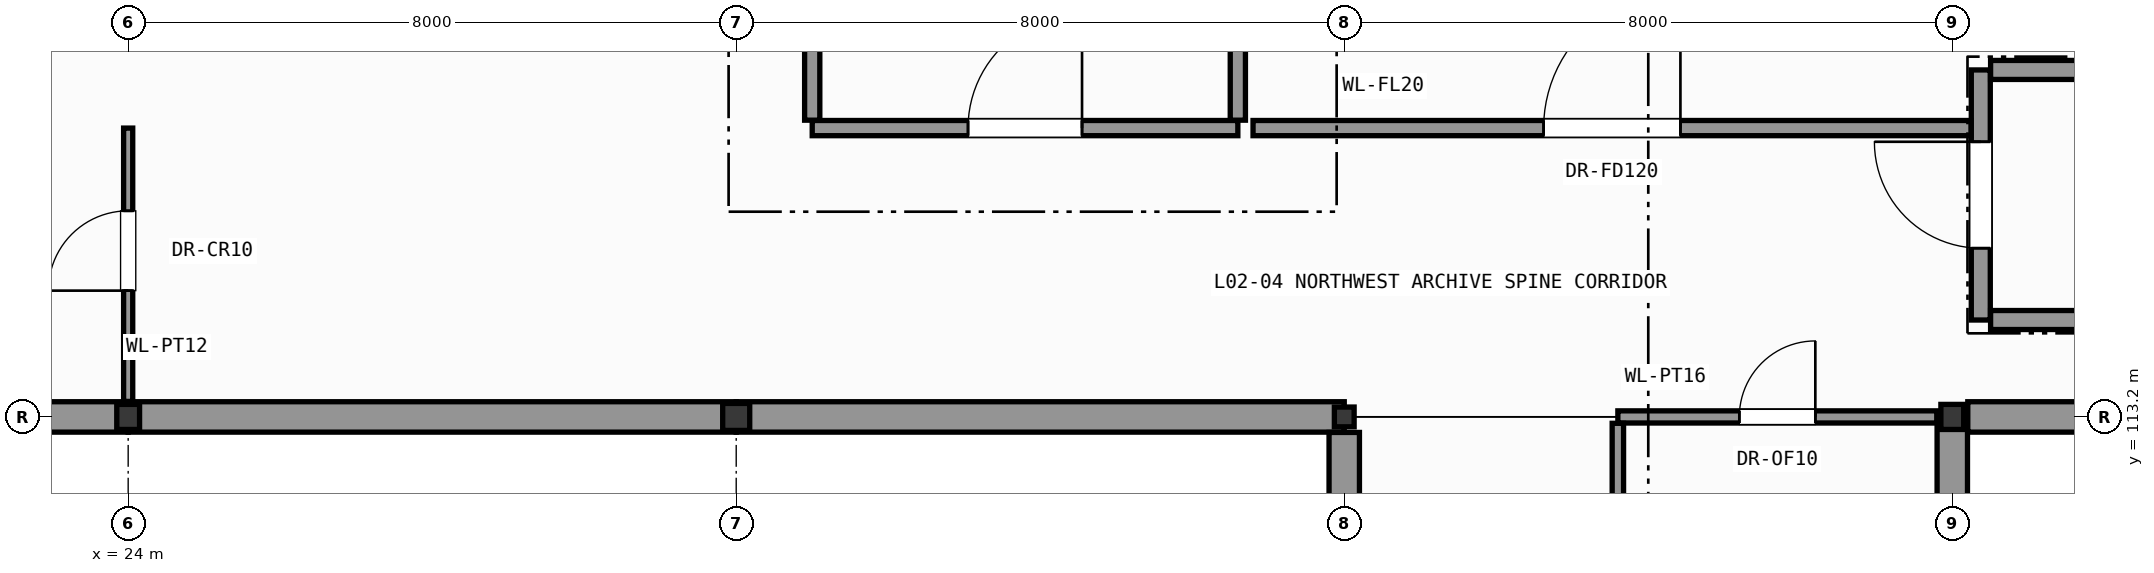
"""IFC4 building model, lengths in metres.
Left out: names, types, materials, properties, quantities, classifications, styles, units other than length and angle.
Written with IfcOpenShell. Run it as: python <this file> out.ifc"""

import sys

from ifc_helpers import new_model, si_unit, direction, frame, frame_2d, origin, origin_2d, place, context, subcontext, project, spatial, rectangle, hollow_rectangle, hollow_circle, i_section, extrude, element, fill, save


model = new_model("IFC4")
c1 = context("Model", 3, precision=1e-05, world=origin(), true_north=direction((0.0, 1.0)))
c2 = subcontext(c1, "Body", "Model", "MODEL_VIEW")
j1 = project(units=[si_unit("LENGTHUNIT", "METRE"), si_unit("PLANEANGLEUNIT", "RADIAN")], contexts=[c1])
p1 = place(None, origin())
s1 = spatial("IfcSite", under=j1, at=p1, CompositionType="ELEMENT")
p2 = place(p1, origin())
s2 = spatial("IfcBuilding", under=s1, at=p2, CompositionType="ELEMENT")
p3 = place(p2, frame((0.0, 0.0, 7.8)))
s3 = spatial("IfcBuildingStorey", under=s2, at=p3, CompositionType="ELEMENT", Elevation=7.8)
p4 = place(p3, frame((24.0, 113.2, 0.0), z_axis=(0.0, 0.0, 1.0), x_axis=(1.0, 0.0, 0.0)))
e1 = element("IfcColumn", 1, at=p4, inside=s3, PredefinedType="COLUMN", context=c2, shape_type="SweptSolid", body=[
    extrude(i_section(OverallWidth=0.3, OverallDepth=0.33, WebThickness=0.01, FlangeThickness=0.017, FilletRadius=0.027, at=origin_2d()), origin(), (0.0, 0.0, 1.0), 5.4),
])
p5 = place(p3, frame((32.0, 113.2, 0.0), z_axis=(0.0, 0.0, 1.0), x_axis=(1.0, 0.0, 0.0)))
e2 = element("IfcColumn", 2, at=p5, inside=s3, PredefinedType="COLUMN", context=c2, shape_type="SweptSolid", body=[
    extrude(hollow_circle(Radius=0.178, WallThickness=0.016, at=origin_2d()), origin(), (0.0, 0.0, 1.0), 5.4),
])
p6 = place(p3, frame((40.0, 113.2, 0.0), z_axis=(0.0, 0.0, 1.0), x_axis=(1.0, 0.0, 0.0)))
e3 = element("IfcColumn", 3, at=p6, inside=s3, PredefinedType="COLUMN", context=c2, shape_type="SweptSolid", body=[
    extrude(hollow_rectangle(XDim=0.26, YDim=0.26, WallThickness=0.012, InnerFilletRadius=0.012, OuterFilletRadius=0.025, at=origin_2d()), origin(), (0.0, 0.0, 1.0), 5.4),
])
p7 = place(p3, frame((48.0, 113.2, 0.0), z_axis=(0.0, 0.0, 1.0), x_axis=(1.0, 0.0, 0.0)))
e4 = element("IfcColumn", 4, at=p7, inside=s3, PredefinedType="COLUMN", context=c2, shape_type="SweptSolid", body=[
    extrude(i_section(OverallWidth=0.3, OverallDepth=0.33, WebThickness=0.01, FlangeThickness=0.017, FilletRadius=0.027, at=origin_2d()), origin(), (0.0, 0.0, 1.0), 5.4),
])
p8 = place(p3, frame((48.0, 113.2, 0.0), z_axis=(0.0, 0.0, 1.0), x_axis=(0.0, -1.0, 0.0)))
e5 = element("IfcWall", 5, at=p8, inside=s3, PredefinedType="SOLIDWALL", context=c2, shape_type="SweptSolid", body=[
    extrude(rectangle(XDim=7.6, YDim=0.4, at=frame_2d((3.8, 0.0))), origin(), (0.0, 0.0, 1.0), 5.15),
])
p9 = place(p3, frame((56.0, 113.2, 0.0), z_axis=(0.0, 0.0, 1.0), x_axis=(-1.0, 0.0, 0.0)))
e6 = element("IfcWall", 6, at=p9, inside=s3, PredefinedType="SOLIDWALL", context=c2, shape_type="SweptSolid", body=[
    extrude(rectangle(XDim=7.796, YDim=0.4, at=frame_2d((3.898, 0.0))), origin(), (0.0, 0.0, 1.0), 5.15),
])
p10 = place(p3, frame((24.0, 113.2, 0.0), z_axis=(0.0, 0.0, 1.0), x_axis=(-1.0, 0.0, 0.0)))
e7 = element("IfcWall", 7, at=p10, inside=s3, PredefinedType="SOLIDWALL", context=c2, shape_type="SweptSolid", body=[
    extrude(rectangle(XDim=4.8, YDim=0.4, at=frame_2d((2.4, 0.0))), origin(), (0.0, 0.0, 1.0), 5.15),
])
for number, where, z_axis, x_axis in (
    (8, (32.0, 113.2, 0.0), (0.0, 0.0, 1.0), (-1.0, 0.0, 0.0)),
    (9, (40.0, 113.2, 0.0), (0.0, 0.0, 1.0), (-1.0, 0.0, 0.0)),
):
    element("IfcWall", number, at=place(p3, frame(where, z_axis=z_axis, x_axis=x_axis)), inside=s3, PredefinedType="SOLIDWALL", context=c2, shape_type="SweptSolid", body=[
        extrude(rectangle(XDim=8.0, YDim=0.4, at=frame_2d((4.0, 0.0))), origin(), (0.0, 0.0, 1.0), 5.15),
    ])
p11 = place(p3, frame((40.0, 105.6, 0.0), z_axis=(0.0, 0.0, 1.0), x_axis=(0.0, 1.0, 0.0)))
e10 = element("IfcWall", 10, at=p11, inside=s3, PredefinedType="SOLIDWALL", context=c2, shape_type="SweptSolid", body=[
    extrude(rectangle(XDim=7.396, YDim=0.4, at=frame_2d((3.698, 0.0))), origin(), (0.0, 0.0, 1.0), 5.15),
])
p12 = place(p3, frame((48.375, 114.475, 0.0), z_axis=(0.0, 0.0, 1.0), x_axis=(0.0, 1.0, 0.0)))
e11 = element("IfcWall", 11, at=p12, inside=s3, PredefinedType="SHEAR", context=c2, shape_type="SweptSolid", body=[
    extrude(rectangle(XDim=3.29, YDim=0.25, at=frame_2d((1.645, 0.0))), origin(), (0.0, 0.0, 1.0), 5.15),
])
p13 = place(p12, frame((0.945, 0.0, 0.0)))
e12 = element("IfcOpeningElement", 12, at=p13, cuts=e11, PredefinedType="OPENING", context=c2, shape_type="SweptSolid", body=[
    extrude(rectangle(XDim=1.4, YDim=2.2, at=frame_2d((0.7, 1.1))), frame((0.0, 0.135, 0.0), z_axis=(0.0, -1.0, 0.0), x_axis=(1.0, 0.0, 0.0)), (0.0, 0.0, 1.0), 0.27),
])
for number, where, z_axis, x_axis in (
    (13, (48.504, 114.475, 0.0), (0.0, 0.0, 1.0), (1.0, 0.0, 0.0)),
    (14, (48.504, 117.765, 0.0), (0.0, 0.0, 1.0), (1.0, 0.0, 0.0)),
):
    element("IfcWall", number, at=place(p3, frame(where, z_axis=z_axis, x_axis=x_axis)), inside=s3, PredefinedType="SHEAR", context=c2, shape_type="SweptSolid", body=[
        extrude(rectangle(XDim=6.892, YDim=0.25, at=frame_2d((3.446, 0.0))), origin(), (0.0, 0.0, 1.0), 5.15),
    ])
p14 = place(p3, frame((33.0, 117.0, 0.0), z_axis=(0.0, 0.0, 1.0), x_axis=(1.0, 0.0, 0.0)))
e15 = element("IfcWall", 15, at=p14, inside=s3, PredefinedType="PARTITIONING", context=c2, shape_type="SweptSolid", body=[
    extrude(rectangle(XDim=5.6, YDim=0.2, at=frame_2d((2.8, 0.0))), origin(), (0.0, 0.0, 1.0), 5.15),
])
p15 = place(p14, frame((2.05, 0.0, 0.0)))
e16 = element("IfcOpeningElement", 16, at=p15, cuts=e15, PredefinedType="OPENING", context=c2, shape_type="SweptSolid", body=[
    extrude(rectangle(XDim=1.5, YDim=2.2, at=frame_2d((0.75, 1.1))), frame((0.0, 0.11, 0.0), z_axis=(0.0, -1.0, 0.0), x_axis=(1.0, 0.0, 0.0)), (0.0, 0.0, 1.0), 0.22),
])
for number, where, z_axis, x_axis in (
    (17, (33.0, 117.104, 0.0), (0.0, 0.0, 1.0), (0.0, 1.0, 0.0)),
    (18, (38.6, 117.104, 0.0), (0.0, 0.0, 1.0), (0.0, 1.0, 0.0)),
):
    element("IfcWall", number, at=place(p3, frame(where, z_axis=z_axis, x_axis=x_axis)), inside=s3, PredefinedType="PARTITIONING", context=c2, shape_type="SweptSolid", body=[
        extrude(rectangle(XDim=5.096, YDim=0.2, at=frame_2d((2.548, 0.0))), origin(), (0.0, 0.0, 1.0), 5.15),
    ])
p16 = place(p3, frame((38.8, 117.0, 0.0), z_axis=(0.0, 0.0, 1.0), x_axis=(1.0, 0.0, 0.0)))
e19 = element("IfcWall", 19, at=p16, inside=s3, PredefinedType="PARTITIONING", context=c2, shape_type="SweptSolid", body=[
    extrude(rectangle(XDim=9.446, YDim=0.2, at=frame_2d((4.723, 0.0))), origin(), (0.0, 0.0, 1.0), 5.15),
])
p17 = place(p16, frame((3.823, 0.0, 0.0)))
e20 = element("IfcOpeningElement", 20, at=p17, cuts=e19, PredefinedType="OPENING", context=c2, shape_type="SweptSolid", body=[
    extrude(rectangle(XDim=1.8, YDim=2.4, at=frame_2d((0.9, 1.2))), frame((0.0, 0.11, 0.0), z_axis=(0.0, -1.0, 0.0), x_axis=(1.0, 0.0, 0.0)), (0.0, 0.0, 1.0), 0.22),
])
p18 = place(p3, frame((24.0, 113.404, 0.0), z_axis=(0.0, 0.0, 1.0), x_axis=(0.0, 1.0, 0.0)))
e21 = element("IfcWall", 21, at=p18, inside=s3, PredefinedType="PARTITIONING", context=c2, shape_type="SweptSolid", body=[
    extrude(rectangle(XDim=3.596, YDim=0.12, at=frame_2d((1.798, 0.0))), origin(), (0.0, 0.0, 1.0), 4.635),
])
p19 = place(p18, frame((1.458, 0.0, 0.0)))
e22 = element("IfcOpeningElement", 22, at=p19, cuts=e21, PredefinedType="OPENING", context=c2, shape_type="SweptSolid", body=[
    extrude(rectangle(XDim=1.05, YDim=2.2, at=frame_2d((0.525, 1.1))), frame((0.0, 0.07, 0.0), z_axis=(0.0, -1.0, 0.0), x_axis=(1.0, 0.0, 0.0)), (0.0, 0.0, 1.0), 0.14),
])
p20 = place(p3, frame((43.6, 113.2, 0.0), z_axis=(0.0, 0.0, 1.0), x_axis=(1.0, 0.0, 0.0)))
e23 = element("IfcWall", 23, at=p20, inside=s3, PredefinedType="PARTITIONING", context=c2, shape_type="SweptSolid", body=[
    extrude(rectangle(XDim=4.196, YDim=0.16, at=frame_2d((2.098, 0.0))), origin(), (0.0, 0.0, 1.0), 4.775),
])
p21 = place(p20, frame((1.598, 0.0, 0.0)))
e24 = element("IfcOpeningElement", 24, at=p21, cuts=e23, PredefinedType="OPENING", context=c2, shape_type="SweptSolid", body=[
    extrude(rectangle(XDim=1.0, YDim=2.15, at=frame_2d((0.5, 1.075))), frame((0.0, 0.09, 0.0), z_axis=(0.0, -1.0, 0.0), x_axis=(1.0, 0.0, 0.0)), (0.0, 0.0, 1.0), 0.18),
])
p22 = place(p3, frame((43.6, 83.4, 0.0), z_axis=(0.0, 0.0, 1.0), x_axis=(0.0, 1.0, 0.0)))
e25 = element("IfcWall", 25, at=p22, inside=s3, PredefinedType="PARTITIONING", context=c2, shape_type="SweptSolid", body=[
    extrude(rectangle(XDim=29.716, YDim=0.15, at=frame_2d((14.858, 0.0))), origin(), (0.0, 0.0, 1.0), 5.15),
])
p23 = place(p22, frame((14.383, 0.0, 0.0)))
e26 = element("IfcOpeningElement", 26, at=p23, cuts=e25, PredefinedType="OPENING", context=c2, shape_type="SweptSolid", body=[
    extrude(rectangle(XDim=0.95, YDim=2.1, at=frame_2d((0.475, 1.05))), frame((0.0, 0.085, 0.0), z_axis=(0.0, -1.0, 0.0), x_axis=(1.0, 0.0, 0.0)), (0.0, 0.0, 1.0), 0.17),
])
p24 = place(p13, origin())
e27 = element("IfcDoor", 27, at=p24, inside=s3, OperationType="SINGLE_SWING_RIGHT", PredefinedType="DOOR", context=c2, shape_type="SweptSolid", body=[
    extrude(rectangle(XDim=1.4, YDim=2.2, at=frame_2d((0.7, 1.1))), frame((0.0, 0.025, 0.0), z_axis=(0.0, -1.0, 0.0), x_axis=(1.0, 0.0, 0.0)), (0.0, 0.0, 1.0), 0.05),
])
fill(e12, e27)
p25 = place(p15, origin())
e28 = element("IfcDoor", 28, at=p25, inside=s3, OperationType="SINGLE_SWING_RIGHT", PredefinedType="DOOR", context=c2, shape_type="SweptSolid", body=[
    extrude(rectangle(XDim=1.5, YDim=2.2, at=frame_2d((0.75, 1.1))), frame((0.0, 0.025, 0.0), z_axis=(0.0, -1.0, 0.0), x_axis=(1.0, 0.0, 0.0)), (0.0, 0.0, 1.0), 0.05),
])
fill(e16, e28)
p26 = place(p17, origin())
e29 = element("IfcDoor", 29, at=p26, inside=s3, OperationType="SINGLE_SWING_RIGHT", PredefinedType="DOOR", context=c2, shape_type="SweptSolid", body=[
    extrude(rectangle(XDim=1.8, YDim=2.4, at=frame_2d((0.9, 1.2))), frame((0.0, 0.025, 0.0), z_axis=(0.0, -1.0, 0.0), x_axis=(1.0, 0.0, 0.0)), (0.0, 0.0, 1.0), 0.05),
])
fill(e20, e29)
p27 = place(p19, origin())
e30 = element("IfcDoor", 30, at=p27, inside=s3, OperationType="SINGLE_SWING_LEFT", PredefinedType="DOOR", context=c2, shape_type="SweptSolid", body=[
    extrude(rectangle(XDim=1.05, YDim=2.2, at=frame_2d((0.525, 1.1))), frame((0.0, 0.025, 0.0), z_axis=(0.0, -1.0, 0.0), x_axis=(1.0, 0.0, 0.0)), (0.0, 0.0, 1.0), 0.05),
])
fill(e22, e30)
p28 = place(p21, origin())
e31 = element("IfcDoor", 31, at=p28, inside=s3, OperationType="SINGLE_SWING_RIGHT", PredefinedType="DOOR", context=c2, shape_type="SweptSolid", body=[
    extrude(rectangle(XDim=1.0, YDim=2.15, at=frame_2d((0.5, 1.075))), frame((0.0, 0.025, 0.0), z_axis=(0.0, -1.0, 0.0), x_axis=(1.0, 0.0, 0.0)), (0.0, 0.0, 1.0), 0.05),
])
fill(e24, e31)
save(model, sys.argv[1])
